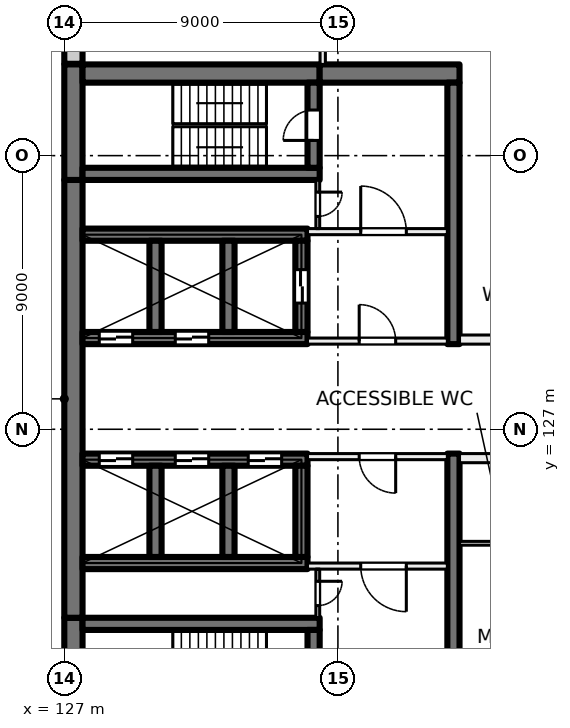
"""IFC4 building model, lengths in metres.
Left out: names, types, materials, properties, quantities, classifications, styles, units other than length and angle.
Written with IfcOpenShell. Run it as: python <this file> out.ifc"""

import sys

from ifc_helpers import new_model, si_unit, direction, frame, frame_2d, origin, place, context, subcontext, project, spatial, rectangle, extrude, element, fill, save


model = new_model("IFC4")
c1 = context("Model", 3, precision=1e-05, world=origin(), true_north=direction((0.0, 1.0)))
c2 = subcontext(c1, "Body", "Model", "MODEL_VIEW")
j1 = project(units=[si_unit("LENGTHUNIT", "METRE"), si_unit("PLANEANGLEUNIT", "RADIAN")], contexts=[c1])
p1 = place(None, origin())
s1 = spatial("IfcSite", under=j1, at=p1, CompositionType="ELEMENT")
p2 = place(p1, origin())
s2 = spatial("IfcBuilding", under=s1, at=p2, CompositionType="ELEMENT")
p3 = place(p2, frame((0.0, 0.0, 39.5)))
s3 = spatial("IfcBuildingStorey", under=s2, at=p3, CompositionType="ELEMENT", Elevation=39.5)
p4 = place(p3, frame((127.3, 117.0, 0.0), z_axis=(0.0, 0.0, 1.0), x_axis=(0.0, 1.0, 0.0)))
e1 = element("IfcWall", 1, at=p4, inside=s3, PredefinedType="SHEAR", context=c2, shape_type="SweptSolid", body=[
    extrude(rectangle(XDim=3.8, YDim=0.6, at=frame_2d((1.9, 0.0))), origin(), (0.0, 0.0, 1.0), 4.0),
])
p5 = place(p3, frame((127.3, 120.8, 0.0), z_axis=(0.0, 0.0, 1.0), x_axis=(0.0, 1.0, 0.0)))
e2 = element("IfcWall", 2, at=p5, inside=s3, PredefinedType="SHEAR", context=c2, shape_type="SweptSolid", body=[
    extrude(rectangle(XDim=14.4, YDim=0.6, at=frame_2d((7.2, 0.0))), origin(), (0.0, 0.0, 1.0), 4.0),
])
p6 = place(p3, frame((127.3, 135.2, 0.0), z_axis=(0.0, 0.0, 1.0), x_axis=(0.0, 1.0, 0.0)))
e3 = element("IfcWall", 3, at=p6, inside=s3, PredefinedType="SHEAR", context=c2, shape_type="SweptSolid", body=[
    extrude(rectangle(XDim=3.8, YDim=0.6, at=frame_2d((1.9, 0.0))), origin(), (0.0, 0.0, 1.0), 4.0),
])
p7 = place(p3, frame((127.6, 138.7, 0.0), z_axis=(0.0, 0.0, 1.0), x_axis=(1.0, 0.0, 0.0)))
e4 = element("IfcWall", 4, at=p7, inside=s3, PredefinedType="SHEAR", context=c2, shape_type="SweptSolid", body=[
    extrude(rectangle(XDim=7.8, YDim=0.6, at=frame_2d((3.9, 0.0))), origin(), (0.0, 0.0, 1.0), 4.0),
])
p8 = place(p3, frame((135.4, 138.7, 0.0), z_axis=(0.0, 0.0, 1.0), x_axis=(1.0, 0.0, 0.0)))
e5 = element("IfcWall", 5, at=p8, inside=s3, PredefinedType="SHEAR", context=c2, shape_type="SweptSolid", body=[
    extrude(rectangle(XDim=4.6, YDim=0.6, at=frame_2d((2.3, 0.0))), origin(), (0.0, 0.0, 1.0), 4.0),
])
p9 = place(p3, frame((127.6, 120.6, 0.0), z_axis=(0.0, 0.0, 1.0), x_axis=(1.0, 0.0, 0.0)))
e6 = element("IfcWall", 6, at=p9, inside=s3, PredefinedType="SHEAR", context=c2, shape_type="SweptSolid", body=[
    extrude(rectangle(XDim=7.8, YDim=0.4, at=frame_2d((3.9, 0.0))), origin(), (0.0, 0.0, 1.0), 4.0),
])
p10 = place(p3, frame((135.2, 117.6, 0.0), z_axis=(0.0, 0.0, 1.0), x_axis=(0.0, 1.0, 0.0)))
e7 = element("IfcWall", 7, at=p10, inside=s3, PredefinedType="SHEAR", context=c2, shape_type="SweptSolid", body=[
    extrude(rectangle(XDim=2.8, YDim=0.4, at=frame_2d((1.4, 0.0))), origin(), (0.0, 0.0, 1.0), 4.0),
])
p11 = place(p10, frame((0.9, 0.0, 0.0)))
e8 = element("IfcOpeningElement", 8, at=p11, cuts=e7, PredefinedType="OPENING", context=c2, shape_type="SweptSolid", body=[
    extrude(rectangle(XDim=1.0, YDim=2.1, at=frame_2d((0.5, 1.05))), frame((0.0, 0.21, 0.0), z_axis=(0.0, -1.0, 0.0), x_axis=(1.0, 0.0, 0.0)), (0.0, 0.0, 1.0), 0.42),
])
p12 = place(p3, frame((127.6, 135.4, 0.0), z_axis=(0.0, 0.0, 1.0), x_axis=(1.0, 0.0, 0.0)))
e9 = element("IfcWall", 9, at=p12, inside=s3, PredefinedType="SHEAR", context=c2, shape_type="SweptSolid", body=[
    extrude(rectangle(XDim=7.8, YDim=0.4, at=frame_2d((3.9, 0.0))), origin(), (0.0, 0.0, 1.0), 4.0),
])
p13 = place(p3, frame((135.2, 135.6, 0.0), z_axis=(0.0, 0.0, 1.0), x_axis=(0.0, 1.0, 0.0)))
e10 = element("IfcWall", 10, at=p13, inside=s3, PredefinedType="SHEAR", context=c2, shape_type="SweptSolid", body=[
    extrude(rectangle(XDim=2.8, YDim=0.4, at=frame_2d((1.4, 0.0))), origin(), (0.0, 0.0, 1.0), 4.0),
])
p14 = place(p13, frame((0.9, 0.0, 0.0)))
e11 = element("IfcOpeningElement", 11, at=p14, cuts=e10, PredefinedType="OPENING", context=c2, shape_type="SweptSolid", body=[
    extrude(rectangle(XDim=1.0, YDim=2.1, at=frame_2d((0.5, 1.05))), frame((0.0, 0.21, 0.0), z_axis=(0.0, -1.0, 0.0), x_axis=(1.0, 0.0, 0.0)), (0.0, 0.0, 1.0), 0.42),
])
p15 = place(p3, frame((127.6, 126.0, 0.0), z_axis=(0.0, 0.0, 1.0), x_axis=(1.0, 0.0, 0.0)))
e12 = element("IfcWall", 12, at=p15, inside=s3, PredefinedType="SHEAR", context=c2, shape_type="SweptSolid", body=[
    extrude(rectangle(XDim=7.4, YDim=0.4, at=frame_2d((3.7, 0.0))), origin(), (0.0, 0.0, 1.0), 4.0),
])
p16 = place(p15, frame((0.55, 0.0, 0.0)))
e13 = element("IfcOpeningElement", 13, at=p16, cuts=e12, PredefinedType="OPENING", context=c2, shape_type="SweptSolid", body=[
    extrude(rectangle(XDim=1.1, YDim=2.1, at=frame_2d((0.55, 1.05))), frame((0.0, 0.21, 0.0), z_axis=(0.0, -1.0, 0.0), x_axis=(1.0, 0.0, 0.0)), (0.0, 0.0, 1.0), 0.42),
])
p17 = place(p15, frame((3.05, 0.0, 0.0)))
e14 = element("IfcOpeningElement", 14, at=p17, cuts=e12, PredefinedType="OPENING", context=c2, shape_type="SweptSolid", body=[
    extrude(rectangle(XDim=1.1, YDim=2.1, at=frame_2d((0.55, 1.05))), frame((0.0, 0.21, 0.0), z_axis=(0.0, -1.0, 0.0), x_axis=(1.0, 0.0, 0.0)), (0.0, 0.0, 1.0), 0.42),
])
p18 = place(p15, frame((5.45, 0.0, 0.0)))
e15 = element("IfcOpeningElement", 15, at=p18, cuts=e12, PredefinedType="OPENING", context=c2, shape_type="SweptSolid", body=[
    extrude(rectangle(XDim=1.1, YDim=2.1, at=frame_2d((0.55, 1.05))), frame((0.0, 0.21, 0.0), z_axis=(0.0, -1.0, 0.0), x_axis=(1.0, 0.0, 0.0)), (0.0, 0.0, 1.0), 0.42),
])
p19 = place(p3, frame((127.6, 122.6, 0.0), z_axis=(0.0, 0.0, 1.0), x_axis=(1.0, 0.0, 0.0)))
e16 = element("IfcWall", 16, at=p19, inside=s3, PredefinedType="SHEAR", context=c2, shape_type="SweptSolid", body=[
    extrude(rectangle(XDim=7.4, YDim=0.4, at=frame_2d((3.7, 0.0))), origin(), (0.0, 0.0, 1.0), 4.0),
])
for number, where, z_axis, x_axis in (
    (17, (130.0, 122.8, 0.0), (0.0, 0.0, 1.0), (0.0, 1.0, 0.0)),
    (18, (132.4, 122.8, 0.0), (0.0, 0.0, 1.0), (0.0, 1.0, 0.0)),
    (19, (134.8, 122.8, 0.0), (0.0, 0.0, 1.0), (0.0, 1.0, 0.0)),
):
    element("IfcWall", number, at=place(p3, frame(where, z_axis=z_axis, x_axis=x_axis)), inside=s3, PredefinedType="SHEAR", context=c2, shape_type="SweptSolid", body=[
        extrude(rectangle(XDim=3.0, YDim=0.4, at=frame_2d((1.5, 0.0))), origin(), (0.0, 0.0, 1.0), 4.0),
    ])
p20 = place(p3, frame((127.6, 130.0, 0.0), z_axis=(0.0, 0.0, 1.0), x_axis=(1.0, 0.0, 0.0)))
e20 = element("IfcWall", 20, at=p20, inside=s3, PredefinedType="SHEAR", context=c2, shape_type="SweptSolid", body=[
    extrude(rectangle(XDim=7.4, YDim=0.4, at=frame_2d((3.7, 0.0))), origin(), (0.0, 0.0, 1.0), 4.0),
])
p21 = place(p20, frame((0.55, 0.0, 0.0)))
e21 = element("IfcOpeningElement", 21, at=p21, cuts=e20, PredefinedType="OPENING", context=c2, shape_type="SweptSolid", body=[
    extrude(rectangle(XDim=1.1, YDim=2.1, at=frame_2d((0.55, 1.05))), frame((0.0, 0.21, 0.0), z_axis=(0.0, -1.0, 0.0), x_axis=(1.0, 0.0, 0.0)), (0.0, 0.0, 1.0), 0.42),
])
p22 = place(p20, frame((3.05, 0.0, 0.0)))
e22 = element("IfcOpeningElement", 22, at=p22, cuts=e20, PredefinedType="OPENING", context=c2, shape_type="SweptSolid", body=[
    extrude(rectangle(XDim=1.1, YDim=2.1, at=frame_2d((0.55, 1.05))), frame((0.0, 0.21, 0.0), z_axis=(0.0, -1.0, 0.0), x_axis=(1.0, 0.0, 0.0)), (0.0, 0.0, 1.0), 0.42),
])
p23 = place(p3, frame((127.6, 133.4, 0.0), z_axis=(0.0, 0.0, 1.0), x_axis=(1.0, 0.0, 0.0)))
e23 = element("IfcWall", 23, at=p23, inside=s3, PredefinedType="SHEAR", context=c2, shape_type="SweptSolid", body=[
    extrude(rectangle(XDim=7.4, YDim=0.4, at=frame_2d((3.7, 0.0))), origin(), (0.0, 0.0, 1.0), 4.0),
])
for number, where, z_axis, x_axis in (
    (24, (130.0, 130.2, 0.0), (0.0, 0.0, 1.0), (0.0, 1.0, 0.0)),
    (25, (132.4, 130.2, 0.0), (0.0, 0.0, 1.0), (0.0, 1.0, 0.0)),
):
    element("IfcWall", number, at=place(p3, frame(where, z_axis=z_axis, x_axis=x_axis)), inside=s3, PredefinedType="SHEAR", context=c2, shape_type="SweptSolid", body=[
        extrude(rectangle(XDim=3.0, YDim=0.4, at=frame_2d((1.5, 0.0))), origin(), (0.0, 0.0, 1.0), 4.0),
    ])
p24 = place(p3, frame((134.8, 130.2, 0.0), z_axis=(0.0, 0.0, 1.0), x_axis=(0.0, 1.0, 0.0)))
e26 = element("IfcWall", 26, at=p24, inside=s3, PredefinedType="SHEAR", context=c2, shape_type="SweptSolid", body=[
    extrude(rectangle(XDim=3.0, YDim=0.4, at=frame_2d((1.5, 0.0))), origin(), (0.0, 0.0, 1.0), 4.0),
])
p25 = place(p24, frame((0.95, 0.0, 0.0)))
e27 = element("IfcOpeningElement", 27, at=p25, cuts=e26, PredefinedType="OPENING", context=c2, shape_type="SweptSolid", body=[
    extrude(rectangle(XDim=1.1, YDim=2.1, at=frame_2d((0.55, 1.05))), frame((0.0, 0.21, 0.0), z_axis=(0.0, -1.0, 0.0), x_axis=(1.0, 0.0, 0.0)), (0.0, 0.0, 1.0), 0.42),
])
for number, where, z_axis, x_axis in (
    (28, (139.8, 117.6, 0.0), (0.0, 0.0, 1.0), (0.0, 1.0, 0.0)),
    (29, (139.8, 129.8, 0.0), (0.0, 0.0, 1.0), (0.0, 1.0, 0.0)),
):
    element("IfcWall", number, at=place(p3, frame(where, z_axis=z_axis, x_axis=x_axis)), inside=s3, PredefinedType="SHEAR", context=c2, shape_type="SweptSolid", body=[
        extrude(rectangle(XDim=8.6, YDim=0.4, at=frame_2d((4.3, 0.0))), origin(), (0.0, 0.0, 1.0), 4.0),
    ])
p26 = place(p3, frame((127.3, 139.02, 0.0), z_axis=(0.0, 0.0, 1.0), x_axis=(0.0, 1.0, 0.0)))
e30 = element("IfcWall", 30, at=p26, inside=s3, PredefinedType="SOLIDWALL", context=c2, shape_type="SweptSolid", body=[
    extrude(rectangle(XDim=2.98, YDim=0.6, at=frame_2d((1.49, 0.0))), origin(), (0.0, 0.0, 1.0), 3.625),
])
p27 = place(p3, frame((135.0, 129.9, 0.0), z_axis=(0.0, 0.0, 1.0), x_axis=(1.0, 0.0, 0.0)))
e31 = element("IfcWall", 31, at=p27, inside=s3, PredefinedType="PARTITIONING", context=c2, shape_type="SweptSolid", body=[
    extrude(rectangle(XDim=4.6, YDim=0.2, at=frame_2d((2.3, 0.0))), origin(), (0.0, 0.0, 1.0), 3.625),
])
p28 = place(p27, frame((1.7, 0.0, 0.0)))
e32 = element("IfcOpeningElement", 32, at=p28, cuts=e31, PredefinedType="OPENING", context=c2, shape_type="SweptSolid", body=[
    extrude(rectangle(XDim=1.2, YDim=2.1, at=frame_2d((0.6, 1.05))), frame((0.0, 0.11, 0.0), z_axis=(0.0, -1.0, 0.0), x_axis=(1.0, 0.0, 0.0)), (0.0, 0.0, 1.0), 0.22),
])
p29 = place(p3, frame((135.0, 133.5, 0.0), z_axis=(0.0, 0.0, 1.0), x_axis=(1.0, 0.0, 0.0)))
e33 = element("IfcWall", 33, at=p29, inside=s3, PredefinedType="PARTITIONING", context=c2, shape_type="SweptSolid", body=[
    extrude(rectangle(XDim=4.6, YDim=0.2, at=frame_2d((2.3, 0.0))), origin(), (0.0, 0.0, 1.0), 3.625),
])
p30 = place(p29, frame((1.75, 0.0, 0.0)))
e34 = element("IfcOpeningElement", 34, at=p30, cuts=e33, PredefinedType="OPENING", context=c2, shape_type="SweptSolid", body=[
    extrude(rectangle(XDim=1.5, YDim=2.1, at=frame_2d((0.75, 1.05))), frame((0.0, 0.11, 0.0), z_axis=(0.0, -1.0, 0.0), x_axis=(1.0, 0.0, 0.0)), (0.0, 0.0, 1.0), 0.22),
])
p31 = place(p3, frame((135.337, 135.2, 0.0), z_axis=(0.0, 0.0, 1.0), x_axis=(0.0, -1.0, 0.0)))
e35 = element("IfcWall", 35, at=p31, inside=s3, PredefinedType="PARTITIONING", context=c2, shape_type="SweptSolid", body=[
    extrude(rectangle(XDim=1.6, YDim=0.125, at=frame_2d((0.8, 0.0))), origin(), (0.0, 0.0, 1.0), 3.625),
])
p32 = place(p31, frame((0.4, 0.0, 0.0)))
e36 = element("IfcOpeningElement", 36, at=p32, cuts=e35, PredefinedType="OPENING", context=c2, shape_type="SweptSolid", body=[
    extrude(rectangle(XDim=0.8, YDim=2.1, at=frame_2d((0.4, 1.05))), frame((0.0, 0.073, 0.0), z_axis=(0.0, -1.0, 0.0), x_axis=(1.0, 0.0, 0.0)), (0.0, 0.0, 1.0), 0.145),
])
p33 = place(p3, frame((139.6, 126.1, 0.0), z_axis=(0.0, 0.0, 1.0), x_axis=(-1.0, 0.0, 0.0)))
e37 = element("IfcWall", 37, at=p33, inside=s3, PredefinedType="PARTITIONING", context=c2, shape_type="SweptSolid", body=[
    extrude(rectangle(XDim=4.6, YDim=0.2, at=frame_2d((2.3, 0.0))), origin(), (0.0, 0.0, 1.0), 3.625),
])
p34 = place(p33, frame((1.7, 0.0, 0.0)))
e38 = element("IfcOpeningElement", 38, at=p34, cuts=e37, PredefinedType="OPENING", context=c2, shape_type="SweptSolid", body=[
    extrude(rectangle(XDim=1.2, YDim=2.1, at=frame_2d((0.6, 1.05))), frame((0.0, 0.11, 0.0), z_axis=(0.0, -1.0, 0.0), x_axis=(1.0, 0.0, 0.0)), (0.0, 0.0, 1.0), 0.22),
])
p35 = place(p3, frame((139.6, 122.5, 0.0), z_axis=(0.0, 0.0, 1.0), x_axis=(-1.0, 0.0, 0.0)))
e39 = element("IfcWall", 39, at=p35, inside=s3, PredefinedType="PARTITIONING", context=c2, shape_type="SweptSolid", body=[
    extrude(rectangle(XDim=4.6, YDim=0.2, at=frame_2d((2.3, 0.0))), origin(), (0.0, 0.0, 1.0), 3.625),
])
p36 = place(p35, frame((1.35, 0.0, 0.0)))
e40 = element("IfcOpeningElement", 40, at=p36, cuts=e39, PredefinedType="OPENING", context=c2, shape_type="SweptSolid", body=[
    extrude(rectangle(XDim=1.5, YDim=2.1, at=frame_2d((0.75, 1.05))), frame((0.0, 0.11, 0.0), z_axis=(0.0, -1.0, 0.0), x_axis=(1.0, 0.0, 0.0)), (0.0, 0.0, 1.0), 0.22),
])
p37 = place(p3, frame((135.337, 122.4, 0.0), z_axis=(0.0, 0.0, 1.0), x_axis=(0.0, -1.0, 0.0)))
e41 = element("IfcWall", 41, at=p37, inside=s3, PredefinedType="PARTITIONING", context=c2, shape_type="SweptSolid", body=[
    extrude(rectangle(XDim=1.6, YDim=0.125, at=frame_2d((0.8, 0.0))), origin(), (0.0, 0.0, 1.0), 3.625),
])
p38 = place(p37, frame((0.4, 0.0, 0.0)))
e42 = element("IfcOpeningElement", 42, at=p38, cuts=e41, PredefinedType="OPENING", context=c2, shape_type="SweptSolid", body=[
    extrude(rectangle(XDim=0.8, YDim=2.1, at=frame_2d((0.4, 1.05))), frame((0.0, 0.073, 0.0), z_axis=(0.0, -1.0, 0.0), x_axis=(1.0, 0.0, 0.0)), (0.0, 0.0, 1.0), 0.145),
])
p39 = place(p3, frame((135.5, 145.4, 0.0), z_axis=(0.0, 0.0, 1.0), x_axis=(0.0, -1.0, 0.0)))
e43 = element("IfcWall", 43, at=p39, inside=s3, PredefinedType="PARTITIONING", context=c2, shape_type="SweptSolid", body=[
    extrude(rectangle(XDim=6.4, YDim=0.175, at=frame_2d((3.2, 0.0))), origin(), (0.0, 0.0, 1.0), 3.625),
])
p40 = place(p39, frame((2.6, 0.0, 0.0)))
e44 = element("IfcOpeningElement", 44, at=p40, cuts=e43, PredefinedType="OPENING", context=c2, shape_type="SweptSolid", body=[
    extrude(rectangle(XDim=1.2, YDim=2.1, at=frame_2d((0.6, 1.05))), frame((0.0, 0.097, 0.0), z_axis=(0.0, -1.0, 0.0), x_axis=(1.0, 0.0, 0.0)), (0.0, 0.0, 1.0), 0.195),
])
p41 = place(p3, frame((148.938, 123.25, 0.0), z_axis=(0.0, 0.0, 1.0), x_axis=(-1.0, 0.0, 0.0)))
e45 = element("IfcWall", 45, at=p41, inside=s3, PredefinedType="PARTITIONING", context=c2, shape_type="SweptSolid", body=[
    extrude(rectangle(XDim=8.938, YDim=0.125, at=frame_2d((4.469, 0.0))), origin(), (0.0, 0.0, 1.0), 3.625),
])
p42 = place(p41, frame((1.809, 0.0, 0.0)))
e46 = element("IfcOpeningElement", 46, at=p42, cuts=e45, PredefinedType="OPENING", context=c2, shape_type="SweptSolid", body=[
    extrude(rectangle(XDim=0.8, YDim=2.1, at=frame_2d((0.4, 1.05))), frame((0.0, 0.073, 0.0), z_axis=(0.0, -1.0, 0.0), x_axis=(1.0, 0.0, 0.0)), (0.0, 0.0, 1.0), 0.145),
])
p43 = place(p41, frame((5.04, 0.0, 0.0)))
e47 = element("IfcOpeningElement", 47, at=p43, cuts=e45, PredefinedType="OPENING", context=c2, shape_type="SweptSolid", body=[
    extrude(rectangle(XDim=0.8, YDim=2.1, at=frame_2d((0.4, 1.05))), frame((0.0, 0.073, 0.0), z_axis=(0.0, -1.0, 0.0), x_axis=(1.0, 0.0, 0.0)), (0.0, 0.0, 1.0), 0.145),
])
p44 = place(p3, frame((140.0, 129.95, 0.0), z_axis=(0.0, 0.0, 1.0), x_axis=(1.0, 0.0, 0.0)))
e48 = element("IfcWall", 48, at=p44, inside=s3, PredefinedType="PARTITIONING", context=c2, shape_type="SweptSolid", body=[
    extrude(rectangle(XDim=14.0, YDim=0.3, at=frame_2d((7.0, 0.0))), origin(), (0.0, 0.0, 1.0), 3.625),
])
p45 = place(p44, frame((6.1, 0.0, 0.0)))
e49 = element("IfcOpeningElement", 49, at=p45, cuts=e48, PredefinedType="OPENING", context=c2, shape_type="SweptSolid", body=[
    extrude(rectangle(XDim=1.8, YDim=2.1, at=frame_2d((0.9, 1.05))), frame((0.0, 0.16, 0.0), z_axis=(0.0, -1.0, 0.0), x_axis=(1.0, 0.0, 0.0)), (0.0, 0.0, 1.0), 0.32),
])
p46 = place(p3, frame((154.0, 126.05, 0.0), z_axis=(0.0, 0.0, 1.0), x_axis=(-1.0, 0.0, 0.0)))
e50 = element("IfcWall", 50, at=p46, inside=s3, PredefinedType="PARTITIONING", context=c2, shape_type="SweptSolid", body=[
    extrude(rectangle(XDim=14.0, YDim=0.3, at=frame_2d((7.0, 0.0))), origin(), (0.0, 0.0, 1.0), 3.625),
])
p47 = place(p46, frame((7.75, 0.0, 0.0)))
e51 = element("IfcOpeningElement", 51, at=p47, cuts=e50, PredefinedType="OPENING", context=c2, shape_type="SweptSolid", body=[
    extrude(rectangle(XDim=1.0, YDim=2.1, at=frame_2d((0.5, 1.05))), frame((0.0, 0.16, 0.0), z_axis=(0.0, -1.0, 0.0), x_axis=(1.0, 0.0, 0.0)), (0.0, 0.0, 1.0), 0.32),
])
p48 = place(p46, frame((1.6, 0.0, 0.0)))
e52 = element("IfcOpeningElement", 52, at=p48, cuts=e50, PredefinedType="OPENING", context=c2, shape_type="SweptSolid", body=[
    extrude(rectangle(XDim=1.8, YDim=2.1, at=frame_2d((0.9, 1.05))), frame((0.0, 0.16, 0.0), z_axis=(0.0, -1.0, 0.0), x_axis=(1.0, 0.0, 0.0)), (0.0, 0.0, 1.0), 0.32),
])
p49 = place(p21, origin())
e53 = element("IfcDoor", 53, at=p49, inside=s3, OperationType="DOUBLE_DOOR_SLIDING", PredefinedType="DOOR", context=c2, shape_type="SweptSolid", body=[
    extrude(rectangle(XDim=1.1, YDim=2.1, at=frame_2d((0.55, 1.05))), frame((0.0, 0.025, 0.0), z_axis=(0.0, -1.0, 0.0), x_axis=(1.0, 0.0, 0.0)), (0.0, 0.0, 1.0), 0.05),
])
fill(e21, e53)
p50 = place(p22, origin())
e54 = element("IfcDoor", 54, at=p50, inside=s3, OperationType="DOUBLE_DOOR_SLIDING", PredefinedType="DOOR", context=c2, shape_type="SweptSolid", body=[
    extrude(rectangle(XDim=1.1, YDim=2.1, at=frame_2d((0.55, 1.05))), frame((0.0, 0.025, 0.0), z_axis=(0.0, -1.0, 0.0), x_axis=(1.0, 0.0, 0.0)), (0.0, 0.0, 1.0), 0.05),
])
fill(e22, e54)
p51 = place(p16, origin())
e55 = element("IfcDoor", 55, at=p51, inside=s3, OperationType="DOUBLE_DOOR_SLIDING", PredefinedType="DOOR", context=c2, shape_type="SweptSolid", body=[
    extrude(rectangle(XDim=1.1, YDim=2.1, at=frame_2d((0.55, 1.05))), frame((0.0, 0.025, 0.0), z_axis=(0.0, -1.0, 0.0), x_axis=(1.0, 0.0, 0.0)), (0.0, 0.0, 1.0), 0.05),
])
fill(e13, e55)
p52 = place(p17, origin())
e56 = element("IfcDoor", 56, at=p52, inside=s3, OperationType="DOUBLE_DOOR_SLIDING", PredefinedType="DOOR", context=c2, shape_type="SweptSolid", body=[
    extrude(rectangle(XDim=1.1, YDim=2.1, at=frame_2d((0.55, 1.05))), frame((0.0, 0.025, 0.0), z_axis=(0.0, -1.0, 0.0), x_axis=(1.0, 0.0, 0.0)), (0.0, 0.0, 1.0), 0.05),
])
fill(e14, e56)
p53 = place(p18, origin())
e57 = element("IfcDoor", 57, at=p53, inside=s3, OperationType="DOUBLE_DOOR_SLIDING", PredefinedType="DOOR", context=c2, shape_type="SweptSolid", body=[
    extrude(rectangle(XDim=1.1, YDim=2.1, at=frame_2d((0.55, 1.05))), frame((0.0, 0.025, 0.0), z_axis=(0.0, -1.0, 0.0), x_axis=(1.0, 0.0, 0.0)), (0.0, 0.0, 1.0), 0.05),
])
fill(e15, e57)
p54 = place(p28, origin())
e58 = element("IfcDoor", 58, at=p54, inside=s3, OperationType="DOUBLE_DOOR_SINGLE_SWING", PredefinedType="DOOR", context=c2, shape_type="SweptSolid", body=[
    extrude(rectangle(XDim=1.2, YDim=2.1, at=frame_2d((0.6, 1.05))), frame((0.0, 0.025, 0.0), z_axis=(0.0, -1.0, 0.0), x_axis=(1.0, 0.0, 0.0)), (0.0, 0.0, 1.0), 0.05),
])
fill(e32, e58)
p55 = place(p30, origin())
e59 = element("IfcDoor", 59, at=p55, inside=s3, OperationType="DOUBLE_DOOR_SINGLE_SWING", PredefinedType="DOOR", context=c2, shape_type="SweptSolid", body=[
    extrude(rectangle(XDim=1.5, YDim=2.1, at=frame_2d((0.75, 1.05))), frame((0.0, 0.025, 0.0), z_axis=(0.0, -1.0, 0.0), x_axis=(1.0, 0.0, 0.0)), (0.0, 0.0, 1.0), 0.05),
])
fill(e34, e59)
p56 = place(p14, origin())
e60 = element("IfcDoor", 60, at=p56, inside=s3, OperationType="SINGLE_SWING_LEFT", PredefinedType="DOOR", context=c2, shape_type="SweptSolid", body=[
    extrude(rectangle(XDim=1.0, YDim=2.1, at=frame_2d((0.5, 1.05))), frame((0.0, 0.025, 0.0), z_axis=(0.0, -1.0, 0.0), x_axis=(1.0, 0.0, 0.0)), (0.0, 0.0, 1.0), 0.05),
])
fill(e11, e60)
p57 = place(p32, origin())
e61 = element("IfcDoor", 61, at=p57, inside=s3, OperationType="SINGLE_SWING_RIGHT", PredefinedType="DOOR", context=c2, shape_type="SweptSolid", body=[
    extrude(rectangle(XDim=0.8, YDim=2.1, at=frame_2d((0.4, 1.05))), frame((0.0, 0.025, 0.0), z_axis=(0.0, -1.0, 0.0), x_axis=(1.0, 0.0, 0.0)), (0.0, 0.0, 1.0), 0.05),
])
fill(e36, e61)
p58 = place(p34, origin())
e62 = element("IfcDoor", 62, at=p58, inside=s3, OperationType="DOUBLE_DOOR_SINGLE_SWING", PredefinedType="DOOR", context=c2, shape_type="SweptSolid", body=[
    extrude(rectangle(XDim=1.2, YDim=2.1, at=frame_2d((0.6, 1.05))), frame((0.0, 0.025, 0.0), z_axis=(0.0, -1.0, 0.0), x_axis=(1.0, 0.0, 0.0)), (0.0, 0.0, 1.0), 0.05),
])
fill(e38, e62)
p59 = place(p36, origin())
e63 = element("IfcDoor", 63, at=p59, inside=s3, OperationType="DOUBLE_DOOR_SINGLE_SWING", PredefinedType="DOOR", context=c2, shape_type="SweptSolid", body=[
    extrude(rectangle(XDim=1.5, YDim=2.1, at=frame_2d((0.75, 1.05))), frame((0.0, 0.025, 0.0), z_axis=(0.0, -1.0, 0.0), x_axis=(1.0, 0.0, 0.0)), (0.0, 0.0, 1.0), 0.05),
])
fill(e40, e63)
p60 = place(p38, origin())
e64 = element("IfcDoor", 64, at=p60, inside=s3, OperationType="SINGLE_SWING_LEFT", PredefinedType="DOOR", context=c2, shape_type="SweptSolid", body=[
    extrude(rectangle(XDim=0.8, YDim=2.1, at=frame_2d((0.4, 1.05))), frame((0.0, 0.025, 0.0), z_axis=(0.0, -1.0, 0.0), x_axis=(1.0, 0.0, 0.0)), (0.0, 0.0, 1.0), 0.05),
])
fill(e42, e64)
p61 = place(p25, origin())
e65 = element("IfcDoor", 65, at=p61, inside=s3, OperationType="DOUBLE_DOOR_SLIDING", PredefinedType="DOOR", context=c2, shape_type="SweptSolid", body=[
    extrude(rectangle(XDim=1.1, YDim=2.1, at=frame_2d((0.55, 1.05))), frame((0.0, 0.025, 0.0), z_axis=(0.0, -1.0, 0.0), x_axis=(1.0, 0.0, 0.0)), (0.0, 0.0, 1.0), 0.05),
])
fill(e27, e65)
save(model, sys.argv[1])
